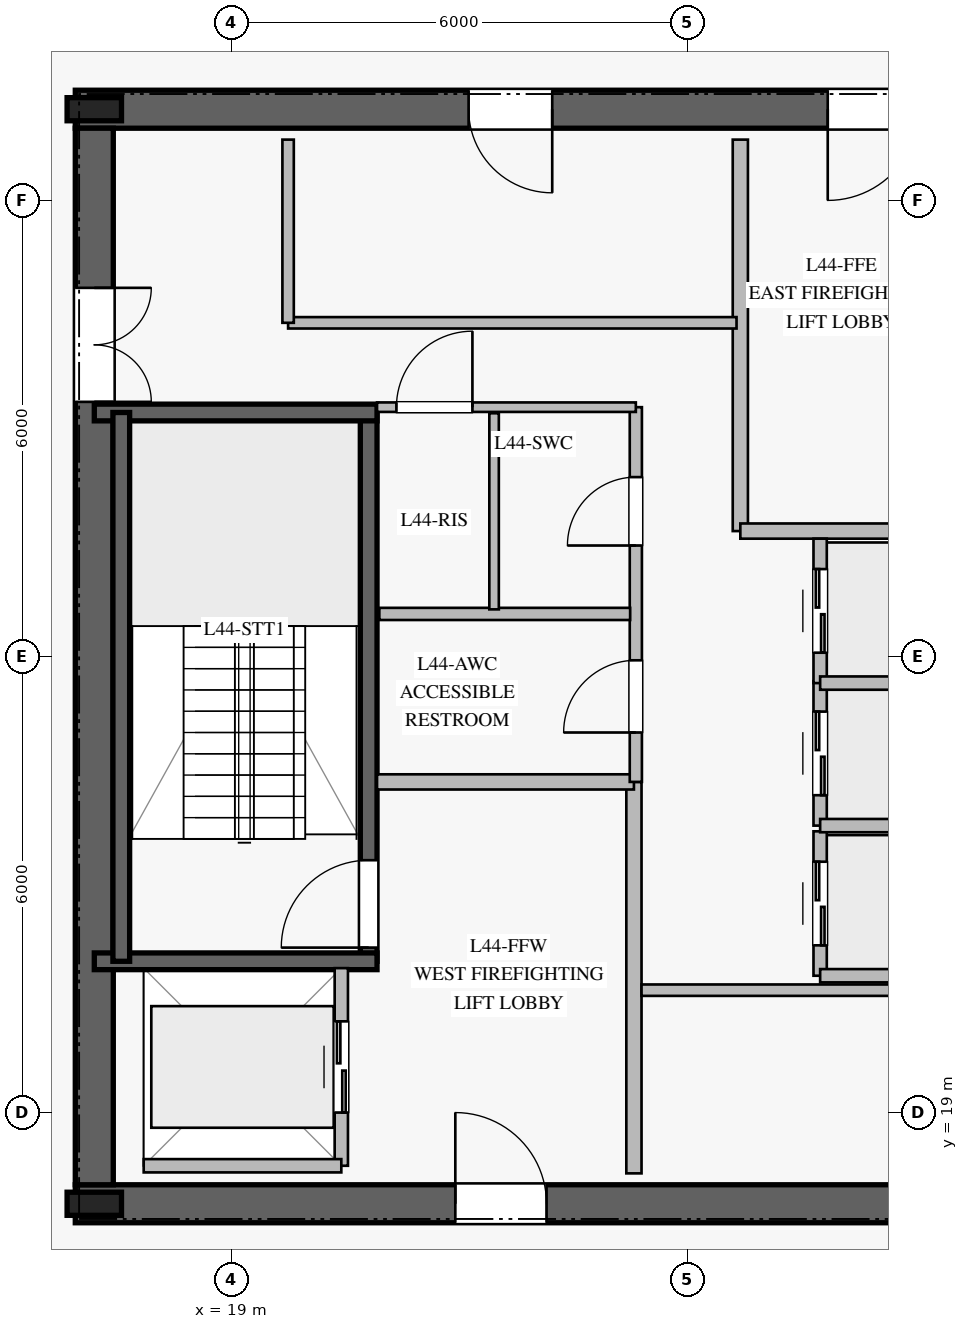
"""IFC4 building model, lengths in metres.
Left out: names, types, materials, properties, quantities, classifications, styles, units other than length and angle.
Written with IfcOpenShell. Run it as: python <this file> out.ifc"""

import sys

from ifc_helpers import new_model, si_unit, direction, frame, frame_2d, origin, origin_2d, place, context, subcontext, project, spatial, rectangle, i_section, extrude, element, fill, save


model = new_model("IFC4")
c1 = context("Model", 3, precision=1e-05, world=origin(), true_north=direction((0.0, 1.0)))
c2 = subcontext(c1, "Body", "Model", "MODEL_VIEW")
j1 = project(units=[si_unit("LENGTHUNIT", "METRE"), si_unit("PLANEANGLEUNIT", "RADIAN")], contexts=[c1])
p1 = place(None, origin())
s1 = spatial("IfcSite", under=j1, at=p1, CompositionType="ELEMENT")
p2 = place(p1, origin())
s2 = spatial("IfcBuilding", under=s1, at=p2, CompositionType="ELEMENT")
p3 = place(p2, frame((0.0, 0.0, 184.8)))
s3 = spatial("IfcBuildingStorey", under=s2, at=p3, CompositionType="ELEMENT", Elevation=184.8)
p4 = place(p3, frame((16.95, 17.8, 0.0), z_axis=(0.0, 0.0, 1.0), x_axis=(1.0, 0.0, 0.0)))
e1 = element("IfcWall", 1, at=p4, inside=s3, PredefinedType="SHEAR", context=c2, shape_type="SweptSolid", body=[
    extrude(rectangle(XDim=16.1, YDim=0.5, at=frame_2d((8.05, 0.0))), origin(), (0.0, 0.0, 1.0), 3.78),
])
p5 = place(p4, frame((5.0, 0.0, 0.0)))
e2 = element("IfcOpeningElement", 2, at=p5, cuts=e1, PredefinedType="OPENING", context=c2, shape_type="SweptSolid", body=[
    extrude(rectangle(XDim=1.2, YDim=2.25, at=frame_2d((0.6, 1.125))), frame((0.0, 0.26, 0.0), z_axis=(0.0, -1.0, 0.0), x_axis=(1.0, 0.0, 0.0)), (0.0, 0.0, 1.0), 0.52),
])
p6 = place(p4, frame((10.9, 0.0, 0.0)))
e3 = element("IfcOpeningElement", 3, at=p6, cuts=e1, PredefinedType="OPENING", context=c2, shape_type="SweptSolid", body=[
    extrude(rectangle(XDim=1.1, YDim=2.2, at=frame_2d((0.55, 1.1))), frame((0.0, 0.26, 0.0), z_axis=(0.0, -1.0, 0.0), x_axis=(1.0, 0.0, 0.0)), (0.0, 0.0, 1.0), 0.52),
])
p7 = place(p3, frame((33.05, 32.2, 0.0), z_axis=(0.0, 0.0, 1.0), x_axis=(-1.0, 0.0, 0.0)))
e4 = element("IfcWall", 4, at=p7, inside=s3, PredefinedType="SHEAR", context=c2, shape_type="SweptSolid", body=[
    extrude(rectangle(XDim=16.1, YDim=0.5, at=frame_2d((8.05, 0.0))), origin(), (0.0, 0.0, 1.0), 3.78),
])
p8 = place(p7, frame((5.0, 0.0, 0.0)))
e5 = element("IfcOpeningElement", 5, at=p8, cuts=e4, PredefinedType="OPENING", context=c2, shape_type="SweptSolid", body=[
    extrude(rectangle(XDim=1.2, YDim=2.25, at=frame_2d((0.6, 1.125))), frame((0.0, 0.26, 0.0), z_axis=(0.0, -1.0, 0.0), x_axis=(1.0, 0.0, 0.0)), (0.0, 0.0, 1.0), 0.52),
])
p9 = place(p7, frame((9.825, 0.0, 0.0)))
e6 = element("IfcOpeningElement", 6, at=p9, cuts=e4, PredefinedType="OPENING", context=c2, shape_type="SweptSolid", body=[
    extrude(rectangle(XDim=1.1, YDim=2.2, at=frame_2d((0.55, 1.1))), frame((0.0, 0.26, 0.0), z_axis=(0.0, -1.0, 0.0), x_axis=(1.0, 0.0, 0.0)), (0.0, 0.0, 1.0), 0.52),
])
p10 = place(p3, frame((17.2, 31.95, 0.0), z_axis=(0.0, 0.0, 1.0), x_axis=(0.0, -1.0, 0.0)))
e7 = element("IfcWall", 7, at=p10, inside=s3, PredefinedType="SHEAR", context=c2, shape_type="SweptSolid", body=[
    extrude(rectangle(XDim=13.9, YDim=0.5, at=frame_2d((6.95, 0.0))), origin(), (0.0, 0.0, 1.0), 3.78),
])
p11 = place(p10, frame((2.1, 0.0, 0.0)))
e8 = element("IfcOpeningElement", 8, at=p11, cuts=e7, PredefinedType="OPENING", context=c2, shape_type="SweptSolid", body=[
    extrude(rectangle(XDim=1.5, YDim=2.2, at=frame_2d((0.75, 1.1))), frame((0.0, 0.26, 0.0), z_axis=(0.0, -1.0, 0.0), x_axis=(1.0, 0.0, 0.0)), (0.0, 0.0, 1.0), 0.52),
])
for number, where, z_axis, x_axis in (
    (9, (17.2, 17.8, 0.0), (0.0, 0.0, 1.0), (1.0, 0.0, 0.0)),
    (10, (17.2, 32.2, 0.0), (0.0, 0.0, 1.0), (1.0, 0.0, 0.0)),
):
    element("IfcColumn", number, at=place(p3, frame(where, z_axis=z_axis, x_axis=x_axis)), inside=s3, PredefinedType="COLUMN", context=c2, shape_type="SweptSolid", body=[
        extrude(i_section(OverallWidth=0.304, OverallDepth=0.716, WebThickness=0.021, FlangeThickness=0.04, at=origin_2d()), origin(), (0.0, 0.0, 1.0), 4.0),
    ])
p12 = place(p3, frame((20.81, 20.99, 0.0), z_axis=(0.0, 0.0, 1.0), x_axis=(0.0, 1.0, 0.0)))
e11 = element("IfcWall", 11, at=p12, inside=s3, PredefinedType="SOLIDWALL", context=c2, shape_type="SweptSolid", body=[
    extrude(rectangle(XDim=7.22, YDim=0.22, at=frame_2d((3.61, 0.0))), origin(), (0.0, 0.0, 1.0), 3.78),
])
p13 = place(p12, frame((0.18, 0.0, 0.0)))
e12 = element("IfcOpeningElement", 12, at=p13, cuts=e11, PredefinedType="OPENING", context=c2, shape_type="SweptSolid", body=[
    extrude(rectangle(XDim=1.15, YDim=2.2, at=frame_2d((0.575, 1.1))), frame((0.0, 0.12, 0.0), z_axis=(0.0, -1.0, 0.0), x_axis=(1.0, 0.0, 0.0)), (0.0, 0.0, 1.0), 0.24),
])
for number, where, z_axis, x_axis in (
    (13, (17.2, 20.99, 0.0), (0.0, 0.0, 1.0), (1.0, 0.0, 0.0)),
    (14, (17.2, 28.21, 0.0), (0.0, 0.0, 1.0), (1.0, 0.0, 0.0)),
):
    element("IfcWall", number, at=place(p3, frame(where, z_axis=z_axis, x_axis=x_axis)), inside=s3, PredefinedType="SOLIDWALL", context=c2, shape_type="SweptSolid", body=[
        extrude(rectangle(XDim=3.72, YDim=0.22, at=frame_2d((1.86, 0.0))), origin(), (0.0, 0.0, 1.0), 3.78),
    ])
p14 = place(p3, frame((17.555, 28.21, 0.0), z_axis=(0.0, 0.0, 1.0), x_axis=(0.0, -1.0, 0.0)))
e15 = element("IfcWall", 15, at=p14, inside=s3, PredefinedType="SOLIDWALL", context=c2, shape_type="SweptSolid", body=[
    extrude(rectangle(XDim=7.22, YDim=0.22, at=frame_2d((3.61, 0.0))), origin(), (0.0, 0.0, 1.0), 3.78),
])
p15 = place(p3, frame((24.3, 18.2, 0.0), z_axis=(0.0, 0.0, 1.0), x_axis=(0.0, 1.0, 0.0)))
e16 = element("IfcWall", 16, at=p15, inside=s3, PredefinedType="PARTITIONING", context=c2, shape_type="SweptSolid", body=[
    extrude(rectangle(XDim=5.15, YDim=0.2, at=frame_2d((2.575, 0.0))), origin(), (0.0, 0.0, 1.0), 3.78),
])
p16 = place(p3, frame((20.92, 23.35, 0.0), z_axis=(0.0, 0.0, 1.0), x_axis=(1.0, 0.0, 0.0)))
e17 = element("IfcWall", 17, at=p16, inside=s3, PredefinedType="PARTITIONING", context=c2, shape_type="SweptSolid", body=[
    extrude(rectangle(XDim=3.38, YDim=0.2, at=frame_2d((1.69, 0.0))), origin(), (0.0, 0.0, 1.0), 3.78),
])
p17 = place(p3, frame((25.7, 26.65, 0.0), z_axis=(0.0, 0.0, 1.0), x_axis=(0.0, 1.0, 0.0)))
e18 = element("IfcWall", 18, at=p17, inside=s3, PredefinedType="PARTITIONING", context=c2, shape_type="SweptSolid", body=[
    extrude(rectangle(XDim=5.15, YDim=0.2, at=frame_2d((2.575, 0.0))), origin(), (0.0, 0.0, 1.0), 3.78),
])
p18 = place(p3, frame((25.7, 26.65, 0.0), z_axis=(0.0, 0.0, 1.0), x_axis=(1.0, 0.0, 0.0)))
e19 = element("IfcWall", 19, at=p18, inside=s3, PredefinedType="PARTITIONING", context=c2, shape_type="SweptSolid", body=[
    extrude(rectangle(XDim=3.38, YDim=0.2, at=frame_2d((1.69, 0.0))), origin(), (0.0, 0.0, 1.0), 3.78),
])
p19 = place(p3, frame((24.325, 23.35, 0.0), z_axis=(0.0, 0.0, 1.0), x_axis=(0.0, 1.0, 0.0)))
e20 = element("IfcWall", 20, at=p19, inside=s3, PredefinedType="PLUMBINGWALL", context=c2, shape_type="SweptSolid", body=[
    extrude(rectangle(XDim=4.93, YDim=0.16, at=frame_2d((2.465, 0.0))), origin(), (0.0, 0.0, 1.0), 3.78),
])
p20 = place(p19, frame((0.65, 0.0, 0.0)))
e21 = element("IfcOpeningElement", 21, at=p20, cuts=e20, PredefinedType="OPENING", context=c2, shape_type="SweptSolid", body=[
    extrude(rectangle(XDim=0.95, YDim=2.1, at=frame_2d((0.475, 1.05))), frame((0.0, 0.09, 0.0), z_axis=(0.0, -1.0, 0.0), x_axis=(1.0, 0.0, 0.0)), (0.0, 0.0, 1.0), 0.18),
])
p21 = place(p19, frame((3.11, 0.0, 0.0)))
e22 = element("IfcOpeningElement", 22, at=p21, cuts=e20, PredefinedType="OPENING", context=c2, shape_type="SweptSolid", body=[
    extrude(rectangle(XDim=0.9, YDim=2.1, at=frame_2d((0.45, 1.05))), frame((0.0, 0.09, 0.0), z_axis=(0.0, -1.0, 0.0), x_axis=(1.0, 0.0, 0.0)), (0.0, 0.0, 1.0), 0.18),
])
p22 = place(p3, frame((20.92, 28.28, 0.0), z_axis=(0.0, 0.0, 1.0), x_axis=(1.0, 0.0, 0.0)))
e23 = element("IfcWall", 23, at=p22, inside=s3, PredefinedType="PARTITIONING", context=c2, shape_type="SweptSolid", body=[
    extrude(rectangle(XDim=3.405, YDim=0.125, at=frame_2d((1.703, 0.0))), origin(), (0.0, 0.0, 1.0), 3.78),
])
p23 = place(p22, frame((0.255, 0.0, 0.0)))
e24 = element("IfcOpeningElement", 24, at=p23, cuts=e23, PredefinedType="OPENING", context=c2, shape_type="SweptSolid", body=[
    extrude(rectangle(XDim=1.0, YDim=2.15, at=frame_2d((0.5, 1.075))), frame((0.0, 0.073, 0.0), z_axis=(0.0, -1.0, 0.0), x_axis=(1.0, 0.0, 0.0)), (0.0, 0.0, 1.0), 0.145),
])
p24 = place(p3, frame((20.95, 25.56, 0.0), z_axis=(0.0, 0.0, 1.0), x_axis=(1.0, 0.0, 0.0)))
e25 = element("IfcWall", 25, at=p24, inside=s3, PredefinedType="PLUMBINGWALL", context=c2, shape_type="SweptSolid", body=[
    extrude(rectangle(XDim=3.3, YDim=0.16, at=frame_2d((1.65, 0.0))), origin(), (0.0, 0.0, 1.0), 3.78),
])
p25 = place(p3, frame((22.46, 25.62, 0.0), z_axis=(0.0, 0.0, 1.0), x_axis=(0.0, 1.0, 0.0)))
e26 = element("IfcWall", 26, at=p25, inside=s3, PredefinedType="PARTITIONING", context=c2, shape_type="SweptSolid", body=[
    extrude(rectangle(XDim=2.58, YDim=0.125, at=frame_2d((1.29, 0.0))), origin(), (0.0, 0.0, 1.0), 3.78),
])
p26 = place(p3, frame((24.4, 20.61, 0.0), z_axis=(0.0, 0.0, 1.0), x_axis=(1.0, 0.0, 0.0)))
e27 = element("IfcWall", 27, at=p26, inside=s3, PredefinedType="PARTITIONING", context=c2, shape_type="SweptSolid", body=[
    extrude(rectangle(XDim=5.9, YDim=0.15, at=frame_2d((2.95, 0.0))), origin(), (0.0, 0.0, 1.0), 3.78),
])
p27 = place(p3, frame((19.75, 29.39, 0.0), z_axis=(0.0, 0.0, 1.0), x_axis=(1.0, 0.0, 0.0)))
e28 = element("IfcWall", 28, at=p27, inside=s3, PredefinedType="PARTITIONING", context=c2, shape_type="SweptSolid", body=[
    extrude(rectangle(XDim=5.9, YDim=0.15, at=frame_2d((2.95, 0.0))), origin(), (0.0, 0.0, 1.0), 3.78),
])
p28 = place(p3, frame((19.75, 29.39, 0.0), z_axis=(0.0, 0.0, 1.0), x_axis=(0.0, 1.0, 0.0)))
e29 = element("IfcWall", 29, at=p28, inside=s3, PredefinedType="PARTITIONING", context=c2, shape_type="SweptSolid", body=[
    extrude(rectangle(XDim=2.41, YDim=0.15, at=frame_2d((1.205, 0.0))), origin(), (0.0, 0.0, 1.0), 3.78),
])
p29 = place(p3, frame((26.75, 20.8, 0.0), z_axis=(0.0, 0.0, 1.0), x_axis=(0.0, 1.0, 0.0)))
e30 = element("IfcWall", 30, at=p29, inside=s3, PredefinedType="PARTITIONING", context=c2, shape_type="SweptSolid", body=[
    extrude(rectangle(XDim=1.9, YDim=0.175, at=frame_2d((0.95, 0.0))), origin(), (0.0, 0.0, 1.0), 3.78),
])
p30 = place(p29, frame((0.4, 0.0, 0.0)))
e31 = element("IfcOpeningElement", 31, at=p30, cuts=e30, PredefinedType="OPENING", context=c2, shape_type="SweptSolid", body=[
    extrude(rectangle(XDim=1.1, YDim=2.2, at=frame_2d((0.55, 1.1))), frame((0.0, 0.098, 0.0), z_axis=(0.0, -1.0, 0.0), x_axis=(1.0, 0.0, 0.0)), (0.0, 0.0, 1.0), 0.195),
])
p31 = place(p3, frame((26.75, 20.8, 0.0), z_axis=(0.0, 0.0, 1.0), x_axis=(1.0, 0.0, 0.0)))
e32 = element("IfcWall", 32, at=p31, inside=s3, PredefinedType="PARTITIONING", context=c2, shape_type="SweptSolid", body=[
    extrude(rectangle(XDim=2.35, YDim=0.175, at=frame_2d((1.175, 0.0))), origin(), (0.0, 0.0, 1.0), 3.78),
])
p32 = place(p3, frame((26.75, 22.775, 0.0), z_axis=(0.0, 0.0, 1.0), x_axis=(0.0, 1.0, 0.0)))
e33 = element("IfcWall", 33, at=p32, inside=s3, PredefinedType="PARTITIONING", context=c2, shape_type="SweptSolid", body=[
    extrude(rectangle(XDim=1.9, YDim=0.175, at=frame_2d((0.95, 0.0))), origin(), (0.0, 0.0, 1.0), 3.78),
])
p33 = place(p32, frame((0.4, 0.0, 0.0)))
e34 = element("IfcOpeningElement", 34, at=p33, cuts=e33, PredefinedType="OPENING", context=c2, shape_type="SweptSolid", body=[
    extrude(rectangle(XDim=1.1, YDim=2.2, at=frame_2d((0.55, 1.1))), frame((0.0, 0.098, 0.0), z_axis=(0.0, -1.0, 0.0), x_axis=(1.0, 0.0, 0.0)), (0.0, 0.0, 1.0), 0.195),
])
p34 = place(p3, frame((26.75, 22.775, 0.0), z_axis=(0.0, 0.0, 1.0), x_axis=(1.0, 0.0, 0.0)))
e35 = element("IfcWall", 35, at=p34, inside=s3, PredefinedType="PARTITIONING", context=c2, shape_type="SweptSolid", body=[
    extrude(rectangle(XDim=2.35, YDim=0.175, at=frame_2d((1.175, 0.0))), origin(), (0.0, 0.0, 1.0), 3.78),
])
p35 = place(p3, frame((26.75, 24.65, 0.0), z_axis=(0.0, 0.0, 1.0), x_axis=(0.0, 1.0, 0.0)))
e36 = element("IfcWall", 36, at=p35, inside=s3, PredefinedType="PARTITIONING", context=c2, shape_type="SweptSolid", body=[
    extrude(rectangle(XDim=1.9, YDim=0.175, at=frame_2d((0.95, 0.0))), origin(), (0.0, 0.0, 1.0), 3.78),
])
p36 = place(p35, frame((0.4, 0.0, 0.0)))
e37 = element("IfcOpeningElement", 37, at=p36, cuts=e36, PredefinedType="OPENING", context=c2, shape_type="SweptSolid", body=[
    extrude(rectangle(XDim=1.1, YDim=2.2, at=frame_2d((0.55, 1.1))), frame((0.0, 0.098, 0.0), z_axis=(0.0, -1.0, 0.0), x_axis=(1.0, 0.0, 0.0)), (0.0, 0.0, 1.0), 0.195),
])
p37 = place(p3, frame((26.75, 24.65, 0.0), z_axis=(0.0, 0.0, 1.0), x_axis=(1.0, 0.0, 0.0)))
e38 = element("IfcWall", 38, at=p37, inside=s3, PredefinedType="PARTITIONING", context=c2, shape_type="SweptSolid", body=[
    extrude(rectangle(XDim=2.35, YDim=0.175, at=frame_2d((1.175, 0.0))), origin(), (0.0, 0.0, 1.0), 3.78),
])
p38 = place(p3, frame((20.45, 18.3, 0.0), z_axis=(0.0, 0.0, 1.0), x_axis=(0.0, 1.0, 0.0)))
e39 = element("IfcWall", 39, at=p38, inside=s3, PredefinedType="PARTITIONING", context=c2, shape_type="SweptSolid", body=[
    extrude(rectangle(XDim=2.6, YDim=0.175, at=frame_2d((1.3, 0.0))), origin(), (0.0, 0.0, 1.0), 3.78),
])
p39 = place(p38, frame((0.7, 0.0, 0.0)))
e40 = element("IfcOpeningElement", 40, at=p39, cuts=e39, PredefinedType="OPENING", context=c2, shape_type="SweptSolid", body=[
    extrude(rectangle(XDim=1.2, YDim=2.2, at=frame_2d((0.6, 1.1))), frame((0.0, 0.098, 0.0), z_axis=(0.0, -1.0, 0.0), x_axis=(1.0, 0.0, 0.0)), (0.0, 0.0, 1.0), 0.195),
])
p40 = place(p3, frame((17.85, 18.3, 0.0), z_axis=(0.0, 0.0, 1.0), x_axis=(1.0, 0.0, 0.0)))
e41 = element("IfcWall", 41, at=p40, inside=s3, PredefinedType="PARTITIONING", context=c2, shape_type="SweptSolid", body=[
    extrude(rectangle(XDim=2.6, YDim=0.175, at=frame_2d((1.3, 0.0))), origin(), (0.0, 0.0, 1.0), 3.78),
])
p41 = place(p13, origin())
e42 = element("IfcDoor", 42, at=p41, inside=s3, OperationType="SINGLE_SWING_LEFT", PredefinedType="DOOR", context=c2, shape_type="SweptSolid", body=[
    extrude(rectangle(XDim=1.15, YDim=2.2, at=frame_2d((0.575, 1.1))), frame((0.0, 0.025, 0.0), z_axis=(0.0, -1.0, 0.0), x_axis=(1.0, 0.0, 0.0)), (0.0, 0.0, 1.0), 0.05),
])
fill(e12, e42)
p42 = place(p5, origin())
e43 = element("IfcDoor", 43, at=p42, inside=s3, OperationType="SINGLE_SWING_LEFT", PredefinedType="DOOR", context=c2, shape_type="SweptSolid", body=[
    extrude(rectangle(XDim=1.2, YDim=2.25, at=frame_2d((0.6, 1.125))), frame((0.0, 0.025, 0.0), z_axis=(0.0, -1.0, 0.0), x_axis=(1.0, 0.0, 0.0)), (0.0, 0.0, 1.0), 0.05),
])
fill(e2, e43)
p43 = place(p8, origin())
e44 = element("IfcDoor", 44, at=p43, inside=s3, OperationType="SINGLE_SWING_RIGHT", PredefinedType="DOOR", context=c2, shape_type="SweptSolid", body=[
    extrude(rectangle(XDim=1.2, YDim=2.25, at=frame_2d((0.6, 1.125))), frame((0.0, 0.025, 0.0), z_axis=(0.0, -1.0, 0.0), x_axis=(1.0, 0.0, 0.0)), (0.0, 0.0, 1.0), 0.05),
])
fill(e5, e44)
p44 = place(p11, origin())
e45 = element("IfcDoor", 45, at=p44, inside=s3, OperationType="DOUBLE_DOOR_SINGLE_SWING", PredefinedType="DOOR", context=c2, shape_type="SweptSolid", body=[
    extrude(rectangle(XDim=1.5, YDim=2.2, at=frame_2d((0.75, 1.1))), frame((0.0, 0.025, 0.0), z_axis=(0.0, -1.0, 0.0), x_axis=(1.0, 0.0, 0.0)), (0.0, 0.0, 1.0), 0.05),
])
fill(e8, e45)
p45 = place(p20, origin())
e46 = element("IfcDoor", 46, at=p45, inside=s3, OperationType="SINGLE_SWING_LEFT", PredefinedType="DOOR", context=c2, shape_type="SweptSolid", body=[
    extrude(rectangle(XDim=0.95, YDim=2.1, at=frame_2d((0.475, 1.05))), frame((0.0, 0.025, 0.0), z_axis=(0.0, -1.0, 0.0), x_axis=(1.0, 0.0, 0.0)), (0.0, 0.0, 1.0), 0.05),
])
fill(e21, e46)
p46 = place(p23, origin())
e47 = element("IfcDoor", 47, at=p46, inside=s3, OperationType="SINGLE_SWING_RIGHT", PredefinedType="DOOR", context=c2, shape_type="SweptSolid", body=[
    extrude(rectangle(XDim=1.0, YDim=2.15, at=frame_2d((0.5, 1.075))), frame((0.0, 0.025, 0.0), z_axis=(0.0, -1.0, 0.0), x_axis=(1.0, 0.0, 0.0)), (0.0, 0.0, 1.0), 0.05),
])
fill(e24, e47)
p47 = place(p21, origin())
e48 = element("IfcDoor", 48, at=p47, inside=s3, OperationType="SINGLE_SWING_LEFT", PredefinedType="DOOR", context=c2, shape_type="SweptSolid", body=[
    extrude(rectangle(XDim=0.9, YDim=2.1, at=frame_2d((0.45, 1.05))), frame((0.0, 0.025, 0.0), z_axis=(0.0, -1.0, 0.0), x_axis=(1.0, 0.0, 0.0)), (0.0, 0.0, 1.0), 0.05),
])
fill(e22, e48)
p48 = place(p9, origin())
e49 = element("IfcDoor", 49, at=p48, inside=s3, OperationType="SINGLE_SWING_LEFT", PredefinedType="DOOR", context=c2, shape_type="SweptSolid", body=[
    extrude(rectangle(XDim=1.1, YDim=2.2, at=frame_2d((0.55, 1.1))), frame((0.0, 0.025, 0.0), z_axis=(0.0, -1.0, 0.0), x_axis=(1.0, 0.0, 0.0)), (0.0, 0.0, 1.0), 0.05),
])
fill(e6, e49)
p49 = place(p30, origin())
e50 = element("IfcDoor", 50, at=p49, inside=s3, OperationType="DOUBLE_DOOR_SLIDING", PredefinedType="DOOR", context=c2, shape_type="SweptSolid", body=[
    extrude(rectangle(XDim=1.1, YDim=2.2, at=frame_2d((0.55, 1.1))), frame((0.0, 0.025, 0.0), z_axis=(0.0, -1.0, 0.0), x_axis=(1.0, 0.0, 0.0)), (0.0, 0.0, 1.0), 0.05),
])
fill(e31, e50)
p50 = place(p33, origin())
e51 = element("IfcDoor", 51, at=p50, inside=s3, OperationType="DOUBLE_DOOR_SLIDING", PredefinedType="DOOR", context=c2, shape_type="SweptSolid", body=[
    extrude(rectangle(XDim=1.1, YDim=2.2, at=frame_2d((0.55, 1.1))), frame((0.0, 0.025, 0.0), z_axis=(0.0, -1.0, 0.0), x_axis=(1.0, 0.0, 0.0)), (0.0, 0.0, 1.0), 0.05),
])
fill(e34, e51)
p51 = place(p36, origin())
e52 = element("IfcDoor", 52, at=p51, inside=s3, OperationType="DOUBLE_DOOR_SLIDING", PredefinedType="DOOR", context=c2, shape_type="SweptSolid", body=[
    extrude(rectangle(XDim=1.1, YDim=2.2, at=frame_2d((0.55, 1.1))), frame((0.0, 0.025, 0.0), z_axis=(0.0, -1.0, 0.0), x_axis=(1.0, 0.0, 0.0)), (0.0, 0.0, 1.0), 0.05),
])
fill(e37, e52)
p52 = place(p39, origin())
e53 = element("IfcDoor", 53, at=p52, inside=s3, OperationType="DOUBLE_DOOR_SLIDING", PredefinedType="DOOR", context=c2, shape_type="SweptSolid", body=[
    extrude(rectangle(XDim=1.2, YDim=2.2, at=frame_2d((0.6, 1.1))), frame((0.0, 0.025, 0.0), z_axis=(0.0, -1.0, 0.0), x_axis=(1.0, 0.0, 0.0)), (0.0, 0.0, 1.0), 0.05),
])
fill(e40, e53)
save(model, sys.argv[1])
